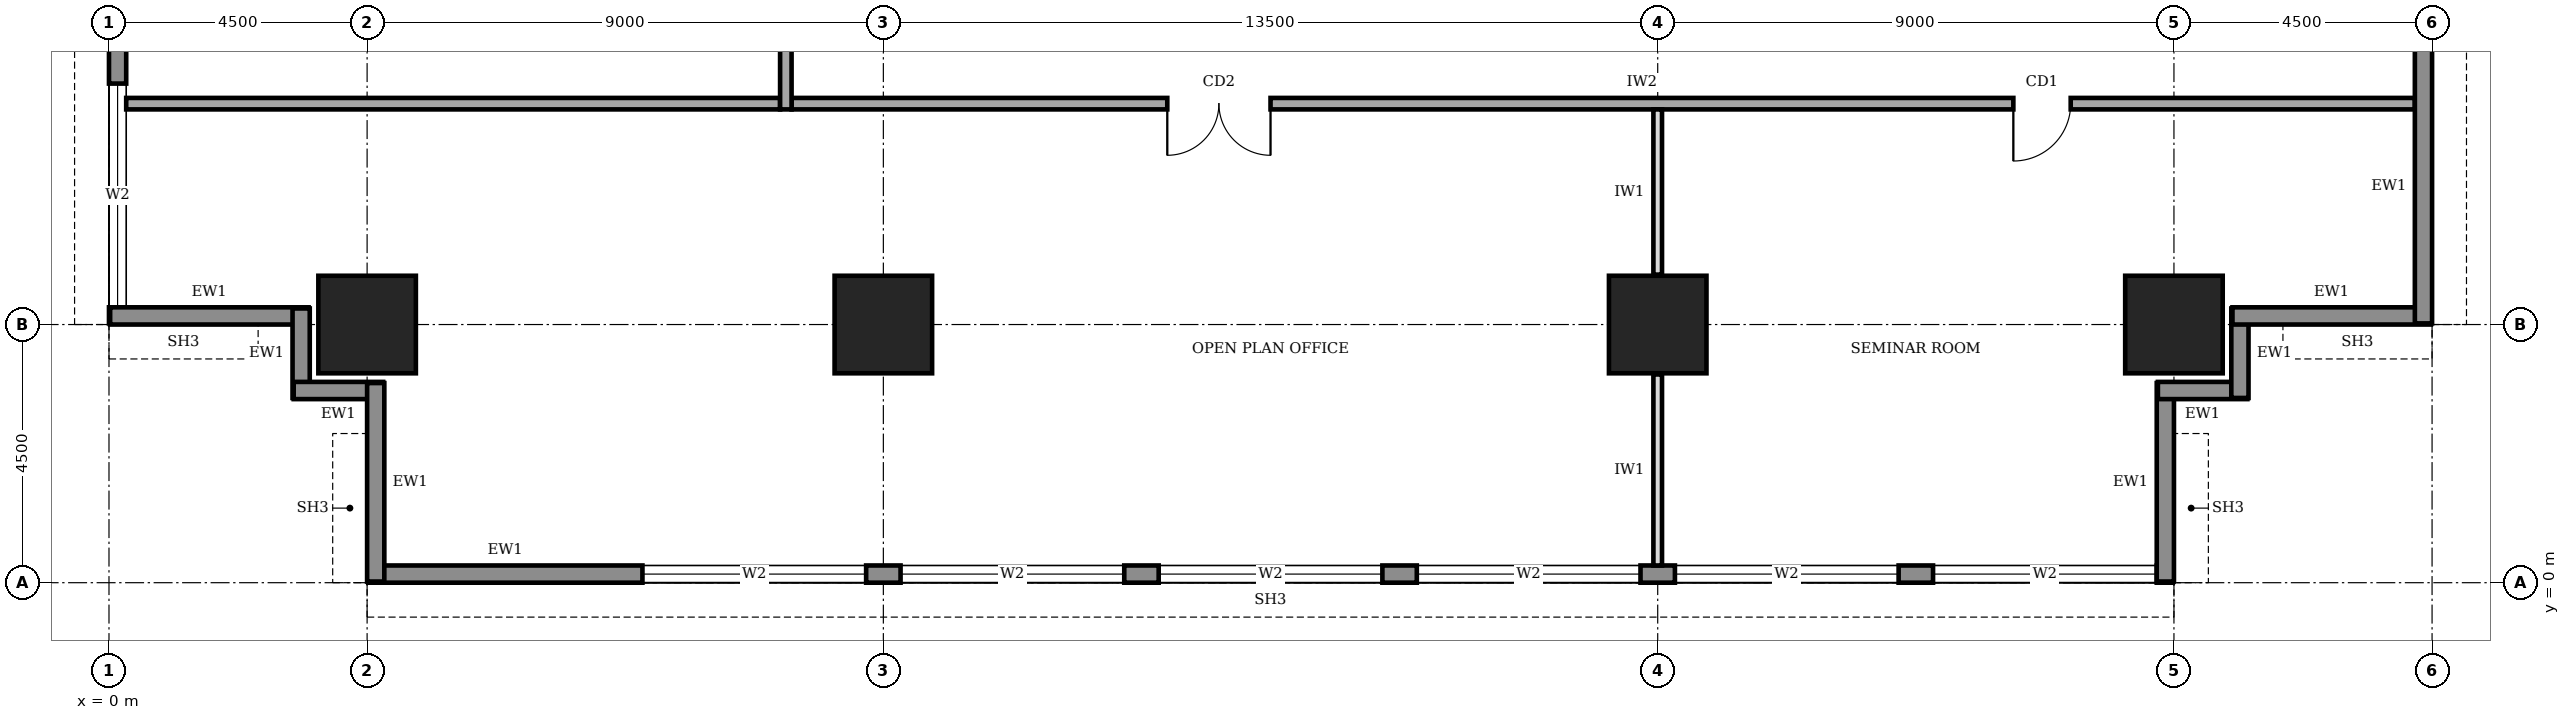
"""IFC4 building model, lengths in metres.
Left out: names, types, materials, properties, quantities, classifications, styles, units other than length and angle.
Written with IfcOpenShell. Run it as: python <this file> out.ifc"""

import sys

from ifc_helpers import new_model, si_unit, direction, frame, frame_2d, origin, origin_2d, place, context, subcontext, project, spatial, rectangle, extrude, element, fill, save


model = new_model("IFC4")
c1 = context("Model", 3, precision=1e-05, world=origin(), true_north=direction((0.0, 1.0)))
c2 = subcontext(c1, "Body", "Model", "MODEL_VIEW")
j1 = project(units=[si_unit("LENGTHUNIT", "METRE"), si_unit("PLANEANGLEUNIT", "RADIAN")], contexts=[c1])
p1 = place(None, origin())
s1 = spatial("IfcSite", under=j1, at=p1, CompositionType="ELEMENT")
p2 = place(p1, origin())
s2 = spatial("IfcBuilding", under=s1, at=p2, CompositionType="ELEMENT")
p3 = place(p2, frame((0.0, 0.0, 161.0)))
s3 = spatial("IfcBuildingStorey", under=s2, at=p3, CompositionType="ELEMENT", Elevation=161.0)
for number, where, z_axis, x_axis in (
    (1, (4.5, 4.5, 0.0), (0.0, 0.0, 1.0), (1.0, 0.0, 0.0)),
    (2, (13.5, 4.5, 0.0), (0.0, 0.0, 1.0), (1.0, 0.0, 0.0)),
    (3, (27.0, 4.5, 0.0), (0.0, 0.0, 1.0), (1.0, 0.0, 0.0)),
    (4, (36.0, 4.5, 0.0), (0.0, 0.0, 1.0), (1.0, 0.0, 0.0)),
):
    element("IfcColumn", number, at=place(p3, frame(where, z_axis=z_axis, x_axis=x_axis)), inside=s3, PredefinedType="COLUMN", context=c2, shape_type="SweptSolid", body=[
        extrude(rectangle(XDim=1.7, YDim=1.7, at=origin_2d()), origin(), (0.0, 0.0, 1.0), 4.0),
    ])
p4 = place(p3, frame((4.52, 0.15, 0.0), z_axis=(0.0, 0.0, 1.0), x_axis=(1.0, 0.0, 0.0)))
e5 = element("IfcWall", 5, at=p4, inside=s3, PredefinedType="STANDARD", context=c2, shape_type="SweptSolid", body=[
    extrude(rectangle(XDim=31.46, YDim=0.3, at=frame_2d((15.73, 0.0))), origin(), (0.0, 0.0, 1.0), 3.75),
])
p5 = place(p4, frame((4.78, 0.0, 0.6)))
e6 = element("IfcOpeningElement", 6, at=p5, cuts=e5, PredefinedType="OPENING", context=c2, shape_type="SweptSolid", body=[
    extrude(rectangle(XDim=3.9, YDim=2.6, at=frame_2d((1.95, 1.3))), frame((0.0, 0.16, 0.0), z_axis=(0.0, -1.0, 0.0), x_axis=(1.0, 0.0, 0.0)), (0.0, 0.0, 1.0), 0.32),
])
p6 = place(p4, frame((9.28, 0.0, 0.6)))
e7 = element("IfcOpeningElement", 7, at=p6, cuts=e5, PredefinedType="OPENING", context=c2, shape_type="SweptSolid", body=[
    extrude(rectangle(XDim=3.9, YDim=2.6, at=frame_2d((1.95, 1.3))), frame((0.0, 0.16, 0.0), z_axis=(0.0, -1.0, 0.0), x_axis=(1.0, 0.0, 0.0)), (0.0, 0.0, 1.0), 0.32),
])
p7 = place(p4, frame((13.78, 0.0, 0.6)))
e8 = element("IfcOpeningElement", 8, at=p7, cuts=e5, PredefinedType="OPENING", context=c2, shape_type="SweptSolid", body=[
    extrude(rectangle(XDim=3.9, YDim=2.6, at=frame_2d((1.95, 1.3))), frame((0.0, 0.16, 0.0), z_axis=(0.0, -1.0, 0.0), x_axis=(1.0, 0.0, 0.0)), (0.0, 0.0, 1.0), 0.32),
])
p8 = place(p4, frame((18.28, 0.0, 0.6)))
e9 = element("IfcOpeningElement", 9, at=p8, cuts=e5, PredefinedType="OPENING", context=c2, shape_type="SweptSolid", body=[
    extrude(rectangle(XDim=3.9, YDim=2.6, at=frame_2d((1.95, 1.3))), frame((0.0, 0.16, 0.0), z_axis=(0.0, -1.0, 0.0), x_axis=(1.0, 0.0, 0.0)), (0.0, 0.0, 1.0), 0.32),
])
p9 = place(p4, frame((22.78, 0.0, 0.6)))
e10 = element("IfcOpeningElement", 10, at=p9, cuts=e5, PredefinedType="OPENING", context=c2, shape_type="SweptSolid", body=[
    extrude(rectangle(XDim=3.9, YDim=2.6, at=frame_2d((1.95, 1.3))), frame((0.0, 0.16, 0.0), z_axis=(0.0, -1.0, 0.0), x_axis=(1.0, 0.0, 0.0)), (0.0, 0.0, 1.0), 0.32),
])
p10 = place(p4, frame((27.28, 0.0, 0.6)))
e11 = element("IfcOpeningElement", 11, at=p10, cuts=e5, PredefinedType="OPENING", context=c2, shape_type="SweptSolid", body=[
    extrude(rectangle(XDim=3.9, YDim=2.6, at=frame_2d((1.95, 1.3))), frame((0.0, 0.16, 0.0), z_axis=(0.0, -1.0, 0.0), x_axis=(1.0, 0.0, 0.0)), (0.0, 0.0, 1.0), 0.32),
])
p11 = place(p3, frame((35.85, 0.02, 0.0), z_axis=(0.0, 0.0, 1.0), x_axis=(0.0, 1.0, 0.0)))
e12 = element("IfcWall", 12, at=p11, inside=s3, PredefinedType="STANDARD", context=c2, shape_type="SweptSolid", body=[
    extrude(rectangle(XDim=3.46, YDim=0.3, at=frame_2d((1.73, 0.0))), origin(), (0.0, 0.0, 1.0), 2.85),
])
for number, where, z_axis, x_axis in (
    (13, (35.72, 3.35, 0.0), (0.0, 0.0, 1.0), (1.0, 0.0, 0.0)),
    (14, (37.15, 3.22, 0.0), (0.0, 0.0, 1.0), (0.0, 1.0, 0.0)),
):
    element("IfcWall", number, at=place(p3, frame(where, z_axis=z_axis, x_axis=x_axis)), inside=s3, PredefinedType="STANDARD", context=c2, shape_type="SweptSolid", body=[
        extrude(rectangle(XDim=1.56, YDim=0.3, at=frame_2d((0.78, 0.0))), origin(), (0.0, 0.0, 1.0), 3.75),
    ])
p12 = place(p3, frame((37.02, 4.65, 0.0), z_axis=(0.0, 0.0, 1.0), x_axis=(1.0, 0.0, 0.0)))
e15 = element("IfcWall", 15, at=p12, inside=s3, PredefinedType="STANDARD", context=c2, shape_type="SweptSolid", body=[
    extrude(rectangle(XDim=3.46, YDim=0.3, at=frame_2d((1.73, 0.0))), origin(), (0.0, 0.0, 1.0), 2.85),
])
p13 = place(p3, frame((40.35, 4.52, 0.0), z_axis=(0.0, 0.0, 1.0), x_axis=(0.0, 1.0, 0.0)))
e16 = element("IfcWall", 16, at=p13, inside=s3, PredefinedType="STANDARD", context=c2, shape_type="SweptSolid", body=[
    extrude(rectangle(XDim=31.46, YDim=0.3, at=frame_2d((15.73, 0.0))), origin(), (0.0, 0.0, 1.0), 3.75),
])
p14 = place(p13, frame((4.78, 0.0, 0.6)))
e17 = element("IfcOpeningElement", 17, at=p14, cuts=e16, PredefinedType="OPENING", context=c2, shape_type="SweptSolid", body=[
    extrude(rectangle(XDim=3.9, YDim=2.6, at=frame_2d((1.95, 1.3))), frame((0.0, 0.16, 0.0), z_axis=(0.0, -1.0, 0.0), x_axis=(1.0, 0.0, 0.0)), (0.0, 0.0, 1.0), 0.32),
])
p15 = place(p13, frame((9.28, 0.0, 0.6)))
e18 = element("IfcOpeningElement", 18, at=p15, cuts=e16, PredefinedType="OPENING", context=c2, shape_type="SweptSolid", body=[
    extrude(rectangle(XDim=3.9, YDim=2.6, at=frame_2d((1.95, 1.3))), frame((0.0, 0.16, 0.0), z_axis=(0.0, -1.0, 0.0), x_axis=(1.0, 0.0, 0.0)), (0.0, 0.0, 1.0), 0.32),
])
p16 = place(p13, frame((13.78, 0.0, 0.6)))
e19 = element("IfcOpeningElement", 19, at=p16, cuts=e16, PredefinedType="OPENING", context=c2, shape_type="SweptSolid", body=[
    extrude(rectangle(XDim=3.9, YDim=2.6, at=frame_2d((1.95, 1.3))), frame((0.0, 0.16, 0.0), z_axis=(0.0, -1.0, 0.0), x_axis=(1.0, 0.0, 0.0)), (0.0, 0.0, 1.0), 0.32),
])
p17 = place(p13, frame((18.28, 0.0, 0.6)))
e20 = element("IfcOpeningElement", 20, at=p17, cuts=e16, PredefinedType="OPENING", context=c2, shape_type="SweptSolid", body=[
    extrude(rectangle(XDim=3.9, YDim=2.6, at=frame_2d((1.95, 1.3))), frame((0.0, 0.16, 0.0), z_axis=(0.0, -1.0, 0.0), x_axis=(1.0, 0.0, 0.0)), (0.0, 0.0, 1.0), 0.32),
])
p18 = place(p13, frame((22.78, 0.0, 0.6)))
e21 = element("IfcOpeningElement", 21, at=p18, cuts=e16, PredefinedType="OPENING", context=c2, shape_type="SweptSolid", body=[
    extrude(rectangle(XDim=3.9, YDim=2.6, at=frame_2d((1.95, 1.3))), frame((0.0, 0.16, 0.0), z_axis=(0.0, -1.0, 0.0), x_axis=(1.0, 0.0, 0.0)), (0.0, 0.0, 1.0), 0.32),
])
p19 = place(p13, frame((27.28, 0.0, 0.6)))
e22 = element("IfcOpeningElement", 22, at=p19, cuts=e16, PredefinedType="OPENING", context=c2, shape_type="SweptSolid", body=[
    extrude(rectangle(XDim=3.9, YDim=2.6, at=frame_2d((1.95, 1.3))), frame((0.0, 0.16, 0.0), z_axis=(0.0, -1.0, 0.0), x_axis=(1.0, 0.0, 0.0)), (0.0, 0.0, 1.0), 0.32),
])
p20 = place(p3, frame((0.15, 35.98, 0.0), z_axis=(0.0, 0.0, 1.0), x_axis=(0.0, -1.0, 0.0)))
e23 = element("IfcWall", 23, at=p20, inside=s3, PredefinedType="STANDARD", context=c2, shape_type="SweptSolid", body=[
    extrude(rectangle(XDim=31.46, YDim=0.3, at=frame_2d((15.73, 0.0))), origin(), (0.0, 0.0, 1.0), 3.75),
])
p21 = place(p20, frame((27.28, 0.0, 0.6)))
e24 = element("IfcOpeningElement", 24, at=p21, cuts=e23, PredefinedType="OPENING", context=c2, shape_type="SweptSolid", body=[
    extrude(rectangle(XDim=3.9, YDim=2.6, at=frame_2d((1.95, 1.3))), frame((0.0, 0.16, 0.0), z_axis=(0.0, -1.0, 0.0), x_axis=(1.0, 0.0, 0.0)), (0.0, 0.0, 1.0), 0.32),
])
p22 = place(p20, frame((22.78, 0.0, 0.6)))
e25 = element("IfcOpeningElement", 25, at=p22, cuts=e23, PredefinedType="OPENING", context=c2, shape_type="SweptSolid", body=[
    extrude(rectangle(XDim=3.9, YDim=2.6, at=frame_2d((1.95, 1.3))), frame((0.0, 0.16, 0.0), z_axis=(0.0, -1.0, 0.0), x_axis=(1.0, 0.0, 0.0)), (0.0, 0.0, 1.0), 0.32),
])
p23 = place(p20, frame((18.28, 0.0, 0.6)))
e26 = element("IfcOpeningElement", 26, at=p23, cuts=e23, PredefinedType="OPENING", context=c2, shape_type="SweptSolid", body=[
    extrude(rectangle(XDim=3.9, YDim=2.6, at=frame_2d((1.95, 1.3))), frame((0.0, 0.16, 0.0), z_axis=(0.0, -1.0, 0.0), x_axis=(1.0, 0.0, 0.0)), (0.0, 0.0, 1.0), 0.32),
])
p24 = place(p20, frame((13.78, 0.0, 0.6)))
e27 = element("IfcOpeningElement", 27, at=p24, cuts=e23, PredefinedType="OPENING", context=c2, shape_type="SweptSolid", body=[
    extrude(rectangle(XDim=3.9, YDim=2.6, at=frame_2d((1.95, 1.3))), frame((0.0, 0.16, 0.0), z_axis=(0.0, -1.0, 0.0), x_axis=(1.0, 0.0, 0.0)), (0.0, 0.0, 1.0), 0.32),
])
p25 = place(p20, frame((9.28, 0.0, 0.6)))
e28 = element("IfcOpeningElement", 28, at=p25, cuts=e23, PredefinedType="OPENING", context=c2, shape_type="SweptSolid", body=[
    extrude(rectangle(XDim=3.9, YDim=2.6, at=frame_2d((1.95, 1.3))), frame((0.0, 0.16, 0.0), z_axis=(0.0, -1.0, 0.0), x_axis=(1.0, 0.0, 0.0)), (0.0, 0.0, 1.0), 0.32),
])
p26 = place(p20, frame((4.78, 0.0, 0.6)))
e29 = element("IfcOpeningElement", 29, at=p26, cuts=e23, PredefinedType="OPENING", context=c2, shape_type="SweptSolid", body=[
    extrude(rectangle(XDim=3.9, YDim=2.6, at=frame_2d((1.95, 1.3))), frame((0.0, 0.16, 0.0), z_axis=(0.0, -1.0, 0.0), x_axis=(1.0, 0.0, 0.0)), (0.0, 0.0, 1.0), 0.32),
])
p27 = place(p3, frame((0.02, 4.65, 0.0), z_axis=(0.0, 0.0, 1.0), x_axis=(1.0, 0.0, 0.0)))
e30 = element("IfcWall", 30, at=p27, inside=s3, PredefinedType="STANDARD", context=c2, shape_type="SweptSolid", body=[
    extrude(rectangle(XDim=3.46, YDim=0.3, at=frame_2d((1.73, 0.0))), origin(), (0.0, 0.0, 1.0), 2.85),
])
for number, where, z_axis, x_axis in (
    (31, (3.35, 4.78, 0.0), (0.0, 0.0, 1.0), (0.0, -1.0, 0.0)),
    (32, (3.22, 3.35, 0.0), (0.0, 0.0, 1.0), (1.0, 0.0, 0.0)),
):
    element("IfcWall", number, at=place(p3, frame(where, z_axis=z_axis, x_axis=x_axis)), inside=s3, PredefinedType="STANDARD", context=c2, shape_type="SweptSolid", body=[
        extrude(rectangle(XDim=1.56, YDim=0.3, at=frame_2d((0.78, 0.0))), origin(), (0.0, 0.0, 1.0), 3.75),
    ])
p28 = place(p3, frame((4.65, 3.48, 0.0), z_axis=(0.0, 0.0, 1.0), x_axis=(0.0, -1.0, 0.0)))
e33 = element("IfcWall", 33, at=p28, inside=s3, PredefinedType="STANDARD", context=c2, shape_type="SweptSolid", body=[
    extrude(rectangle(XDim=3.46, YDim=0.3, at=frame_2d((1.73, 0.0))), origin(), (0.0, 0.0, 1.0), 2.85),
])
p29 = place(p3, frame((11.9, 8.35, 0.0), z_axis=(0.0, 0.0, 1.0), x_axis=(1.0, 0.0, 0.0)))
e34 = element("IfcWall", 34, at=p29, inside=s3, PredefinedType="SOLIDWALL", context=c2, shape_type="SweptSolid", body=[
    extrude(rectangle(XDim=28.3, YDim=0.2, at=frame_2d((14.15, 0.0))), origin(), (0.0, 0.0, 1.0), 3.75),
])
p30 = place(p29, frame((6.55, 0.0, 0.0)))
e35 = element("IfcOpeningElement", 35, at=p30, cuts=e34, PredefinedType="OPENING", context=c2, shape_type="SweptSolid", body=[
    extrude(rectangle(XDim=1.8, YDim=2.1, at=frame_2d((0.9, 1.05))), frame((0.0, 0.11, 0.0), z_axis=(0.0, -1.0, 0.0), x_axis=(1.0, 0.0, 0.0)), (0.0, 0.0, 1.0), 0.22),
])
p31 = place(p29, frame((21.3, 0.0, 0.0)))
e36 = element("IfcOpeningElement", 36, at=p31, cuts=e34, PredefinedType="OPENING", context=c2, shape_type="SweptSolid", body=[
    extrude(rectangle(XDim=1.0, YDim=2.1, at=frame_2d((0.5, 1.05))), frame((0.0, 0.11, 0.0), z_axis=(0.0, -1.0, 0.0), x_axis=(1.0, 0.0, 0.0)), (0.0, 0.0, 1.0), 0.22),
])
p32 = place(p3, frame((11.8, 32.05, 0.0), z_axis=(0.0, 0.0, 1.0), x_axis=(0.0, -1.0, 0.0)))
e37 = element("IfcWall", 37, at=p32, inside=s3, PredefinedType="SOLIDWALL", context=c2, shape_type="SweptSolid", body=[
    extrude(rectangle(XDim=23.8, YDim=0.2, at=frame_2d((11.9, 0.0))), origin(), (0.0, 0.0, 1.0), 3.75),
])
p33 = place(p32, frame((20.675, 0.0, 0.0)))
e38 = element("IfcOpeningElement", 38, at=p33, cuts=e37, PredefinedType="OPENING", context=c2, shape_type="SweptSolid", body=[
    extrude(rectangle(XDim=1.0, YDim=2.1, at=frame_2d((0.5, 1.05))), frame((0.0, 0.11, 0.0), z_axis=(0.0, -1.0, 0.0), x_axis=(1.0, 0.0, 0.0)), (0.0, 0.0, 1.0), 0.22),
])
p34 = place(p32, frame((16.95, 0.0, 0.0)))
e39 = element("IfcOpeningElement", 39, at=p34, cuts=e37, PredefinedType="OPENING", context=c2, shape_type="SweptSolid", body=[
    extrude(rectangle(XDim=1.0, YDim=2.1, at=frame_2d((0.5, 1.05))), frame((0.0, 0.11, 0.0), z_axis=(0.0, -1.0, 0.0), x_axis=(1.0, 0.0, 0.0)), (0.0, 0.0, 1.0), 0.22),
])
p35 = place(p32, frame((13.95, 0.0, 0.0)))
e40 = element("IfcOpeningElement", 40, at=p35, cuts=e37, PredefinedType="OPENING", context=c2, shape_type="SweptSolid", body=[
    extrude(rectangle(XDim=0.9, YDim=2.1, at=frame_2d((0.45, 1.05))), frame((0.0, 0.11, 0.0), z_axis=(0.0, -1.0, 0.0), x_axis=(1.0, 0.0, 0.0)), (0.0, 0.0, 1.0), 0.22),
])
p36 = place(p32, frame((10.9, 0.0, 0.0)))
e41 = element("IfcOpeningElement", 41, at=p36, cuts=e37, PredefinedType="OPENING", context=c2, shape_type="SweptSolid", body=[
    extrude(rectangle(XDim=0.9, YDim=2.1, at=frame_2d((0.45, 1.05))), frame((0.0, 0.11, 0.0), z_axis=(0.0, -1.0, 0.0), x_axis=(1.0, 0.0, 0.0)), (0.0, 0.0, 1.0), 0.22),
])
p37 = place(p32, frame((6.2, 0.0, 0.0)))
e42 = element("IfcOpeningElement", 42, at=p37, cuts=e37, PredefinedType="OPENING", context=c2, shape_type="SweptSolid", body=[
    extrude(rectangle(XDim=0.9, YDim=2.1, at=frame_2d((0.45, 1.05))), frame((0.0, 0.11, 0.0), z_axis=(0.0, -1.0, 0.0), x_axis=(1.0, 0.0, 0.0)), (0.0, 0.0, 1.0), 0.22),
])
p38 = place(p32, frame((8.75, 0.0, 0.0)))
e43 = element("IfcOpeningElement", 43, at=p38, cuts=e37, PredefinedType="OPENING", context=c2, shape_type="SweptSolid", body=[
    extrude(rectangle(XDim=1.0, YDim=2.1, at=frame_2d((0.5, 1.05))), frame((0.0, 0.11, 0.0), z_axis=(0.0, -1.0, 0.0), x_axis=(1.0, 0.0, 0.0)), (0.0, 0.0, 1.0), 0.22),
])
p39 = place(p32, frame((1.925, 0.0, 0.0)))
e44 = element("IfcOpeningElement", 44, at=p39, cuts=e37, PredefinedType="OPENING", context=c2, shape_type="SweptSolid", body=[
    extrude(rectangle(XDim=1.0, YDim=2.1, at=frame_2d((0.5, 1.05))), frame((0.0, 0.11, 0.0), z_axis=(0.0, -1.0, 0.0), x_axis=(1.0, 0.0, 0.0)), (0.0, 0.0, 1.0), 0.22),
])
p40 = place(p3, frame((0.3, 8.35, 0.0), z_axis=(0.0, 0.0, 1.0), x_axis=(1.0, 0.0, 0.0)))
e45 = element("IfcWall", 45, at=p40, inside=s3, PredefinedType="SOLIDWALL", context=c2, shape_type="SweptSolid", body=[
    extrude(rectangle(XDim=11.4, YDim=0.2, at=frame_2d((5.7, 0.0))), origin(), (0.0, 0.0, 1.0), 3.75),
])
p41 = place(p3, frame((27.0, 0.3, 0.0), z_axis=(0.0, 0.0, 1.0), x_axis=(0.0, 1.0, 0.0)))
e46 = element("IfcWall", 46, at=p41, inside=s3, PredefinedType="PARTITIONING", context=c2, shape_type="SweptSolid", body=[
    extrude(rectangle(XDim=3.33, YDim=0.15, at=frame_2d((1.665, 0.0))), origin(), (0.0, 0.0, 1.0), 2.85),
])
p42 = place(p3, frame((27.0, 5.37, 0.0), z_axis=(0.0, 0.0, 1.0), x_axis=(0.0, 1.0, 0.0)))
e47 = element("IfcWall", 47, at=p42, inside=s3, PredefinedType="PARTITIONING", context=c2, shape_type="SweptSolid", body=[
    extrude(rectangle(XDim=2.88, YDim=0.15, at=frame_2d((1.44, 0.0))), origin(), (0.0, 0.0, 1.0), 2.85),
])
p43 = place(p5, origin())
e48 = element("IfcWindow", 48, at=p43, inside=s3, PartitioningType="SINGLE_PANEL", PredefinedType="WINDOW", context=c2, shape_type="SweptSolid", body=[
    extrude(rectangle(XDim=3.9, YDim=2.6, at=frame_2d((1.95, 1.3))), frame((0.0, 0.03, 0.0), z_axis=(0.0, -1.0, 0.0), x_axis=(1.0, 0.0, 0.0)), (0.0, 0.0, 1.0), 0.06),
])
fill(e6, e48)
p44 = place(p6, origin())
e49 = element("IfcWindow", 49, at=p44, inside=s3, PartitioningType="SINGLE_PANEL", PredefinedType="WINDOW", context=c2, shape_type="SweptSolid", body=[
    extrude(rectangle(XDim=3.9, YDim=2.6, at=frame_2d((1.95, 1.3))), frame((0.0, 0.03, 0.0), z_axis=(0.0, -1.0, 0.0), x_axis=(1.0, 0.0, 0.0)), (0.0, 0.0, 1.0), 0.06),
])
fill(e7, e49)
p45 = place(p7, origin())
e50 = element("IfcWindow", 50, at=p45, inside=s3, PartitioningType="SINGLE_PANEL", PredefinedType="WINDOW", context=c2, shape_type="SweptSolid", body=[
    extrude(rectangle(XDim=3.9, YDim=2.6, at=frame_2d((1.95, 1.3))), frame((0.0, 0.03, 0.0), z_axis=(0.0, -1.0, 0.0), x_axis=(1.0, 0.0, 0.0)), (0.0, 0.0, 1.0), 0.06),
])
fill(e8, e50)
p46 = place(p8, origin())
e51 = element("IfcWindow", 51, at=p46, inside=s3, PartitioningType="SINGLE_PANEL", PredefinedType="WINDOW", context=c2, shape_type="SweptSolid", body=[
    extrude(rectangle(XDim=3.9, YDim=2.6, at=frame_2d((1.95, 1.3))), frame((0.0, 0.03, 0.0), z_axis=(0.0, -1.0, 0.0), x_axis=(1.0, 0.0, 0.0)), (0.0, 0.0, 1.0), 0.06),
])
fill(e9, e51)
p47 = place(p9, origin())
e52 = element("IfcWindow", 52, at=p47, inside=s3, PartitioningType="SINGLE_PANEL", PredefinedType="WINDOW", context=c2, shape_type="SweptSolid", body=[
    extrude(rectangle(XDim=3.9, YDim=2.6, at=frame_2d((1.95, 1.3))), frame((0.0, 0.03, 0.0), z_axis=(0.0, -1.0, 0.0), x_axis=(1.0, 0.0, 0.0)), (0.0, 0.0, 1.0), 0.06),
])
fill(e10, e52)
p48 = place(p10, origin())
e53 = element("IfcWindow", 53, at=p48, inside=s3, PartitioningType="SINGLE_PANEL", PredefinedType="WINDOW", context=c2, shape_type="SweptSolid", body=[
    extrude(rectangle(XDim=3.9, YDim=2.6, at=frame_2d((1.95, 1.3))), frame((0.0, 0.03, 0.0), z_axis=(0.0, -1.0, 0.0), x_axis=(1.0, 0.0, 0.0)), (0.0, 0.0, 1.0), 0.06),
])
fill(e11, e53)
p49 = place(p21, origin())
e54 = element("IfcWindow", 54, at=p49, inside=s3, PartitioningType="SINGLE_PANEL", PredefinedType="WINDOW", context=c2, shape_type="SweptSolid", body=[
    extrude(rectangle(XDim=3.9, YDim=2.6, at=frame_2d((1.95, 1.3))), frame((0.0, 0.03, 0.0), z_axis=(0.0, -1.0, 0.0), x_axis=(1.0, 0.0, 0.0)), (0.0, 0.0, 1.0), 0.06),
])
fill(e24, e54)
p50 = place(p30, frame((1.8, 0.0, 0.0), z_axis=(0.0, 0.0, 1.0), x_axis=(-1.0, 0.0, 0.0)))
e55 = element("IfcDoor", 55, at=p50, inside=s3, OperationType="DOUBLE_DOOR_SINGLE_SWING", PredefinedType="DOOR", context=c2, shape_type="SweptSolid", body=[
    extrude(rectangle(XDim=1.8, YDim=2.1, at=frame_2d((0.9, 1.05))), frame((0.0, 0.025, 0.0), z_axis=(0.0, -1.0, 0.0), x_axis=(1.0, 0.0, 0.0)), (0.0, 0.0, 1.0), 0.05),
])
fill(e35, e55)
p51 = place(p31, frame((1.0, 0.0, 0.0), z_axis=(0.0, 0.0, 1.0), x_axis=(-1.0, 0.0, 0.0)))
e56 = element("IfcDoor", 56, at=p51, inside=s3, OperationType="SINGLE_SWING_RIGHT", PredefinedType="DOOR", context=c2, shape_type="SweptSolid", body=[
    extrude(rectangle(XDim=1.0, YDim=2.1, at=frame_2d((0.5, 1.05))), frame((0.0, 0.025, 0.0), z_axis=(0.0, -1.0, 0.0), x_axis=(1.0, 0.0, 0.0)), (0.0, 0.0, 1.0), 0.05),
])
fill(e36, e56)
save(model, sys.argv[1])
